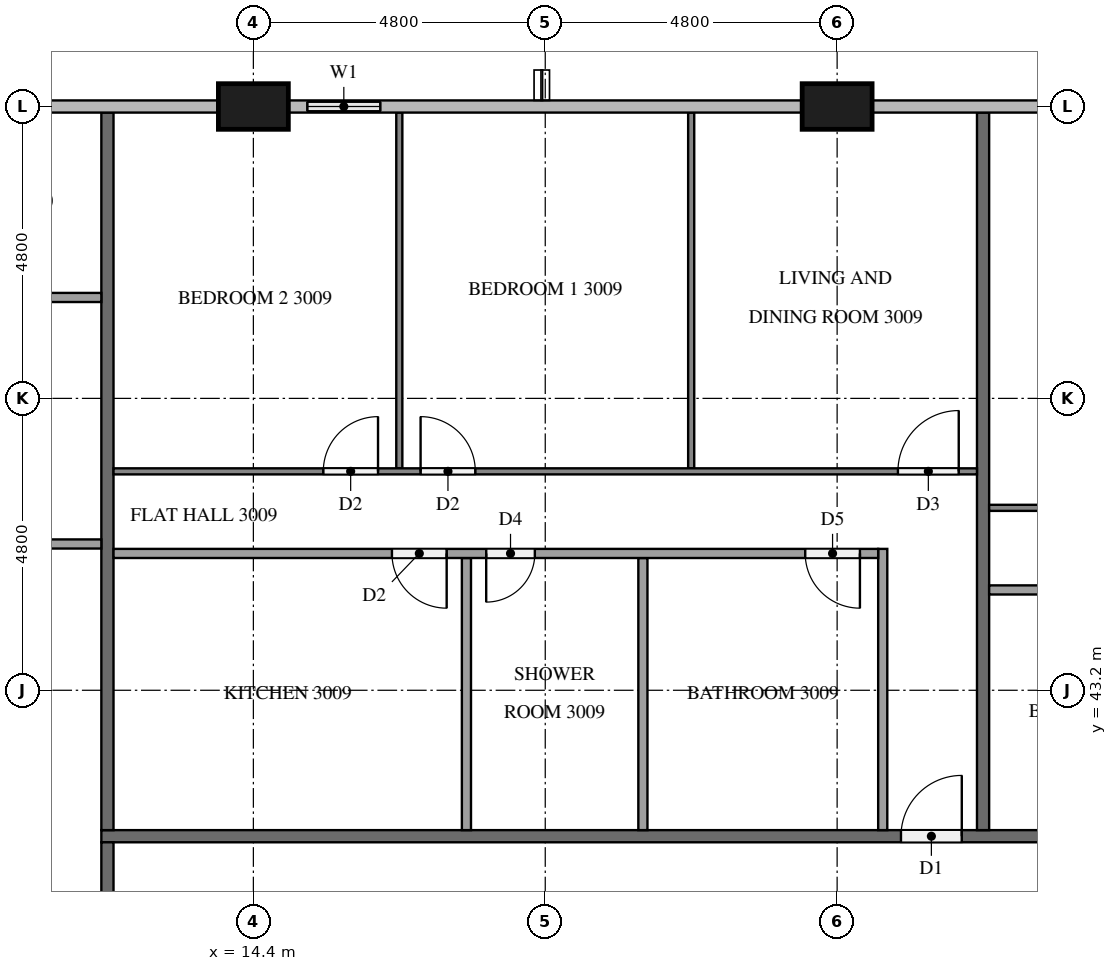
"""IFC4 building model, lengths in metres.
Left out: names, types, materials, properties, quantities, classifications, styles, units other than length and angle.
Written with IfcOpenShell. Run it as: python <this file> out.ifc"""

import sys

from ifc_helpers import new_model, si_unit, direction, frame, frame_2d, origin, origin_2d, place, context, subcontext, project, spatial, rectangle, extrude, element, fill, save


model = new_model("IFC4")
c1 = context("Model", 3, precision=1e-05, world=origin(), true_north=direction((0.0, 1.0)))
c2 = subcontext(c1, "Body", "Model", "MODEL_VIEW")
j1 = project(units=[si_unit("LENGTHUNIT", "METRE"), si_unit("PLANEANGLEUNIT", "RADIAN")], contexts=[c1])
p1 = place(None, origin())
s1 = spatial("IfcSite", under=j1, at=p1, CompositionType="ELEMENT")
p2 = place(p1, origin())
s2 = spatial("IfcBuilding", under=s1, at=p2, CompositionType="ELEMENT")
p3 = place(p2, frame((0.0, 0.0, 119.1)))
s3 = spatial("IfcBuildingStorey", under=s2, at=p3, CompositionType="ELEMENT", Elevation=119.1)
for number, where, z_axis, x_axis in (
    (1, (24.0, 52.8, 0.0), (0.0, 0.0, 1.0), (1.0, 0.0, 0.0)),
    (2, (14.4, 52.8, 0.0), (0.0, 0.0, 1.0), (1.0, 0.0, 0.0)),
):
    element("IfcColumn", number, at=place(p3, frame(where, z_axis=z_axis, x_axis=x_axis)), inside=s3, PredefinedType="COLUMN", context=c2, shape_type="SweptSolid", body=[
        extrude(rectangle(XDim=1.15, YDim=0.75, at=origin_2d()), origin(), (0.0, 0.0, 1.0), 3.2),
    ])
p4 = place(p3, frame((16.8, 52.8, 0.0), z_axis=(0.0, 0.0, 1.0), x_axis=(-1.0, 0.0, 0.0)))
e3 = element("IfcWall", 3, at=p4, inside=s3, PredefinedType="SOLIDWALL", context=c2, shape_type="SweptSolid", body=[
    extrude(rectangle(XDim=1.825, YDim=0.15, at=frame_2d((0.913, 0.0))), origin(), (0.0, 0.0, 1.0), 3.2),
])
p5 = place(p4, frame((0.312, 0.0, 0.9)))
e4 = element("IfcOpeningElement", 4, at=p5, cuts=e3, PredefinedType="OPENING", context=c2, shape_type="SweptSolid", body=[
    extrude(rectangle(XDim=1.2, YDim=1.4, at=frame_2d((0.6, 0.7))), frame((0.0, 0.085, 0.0), z_axis=(0.0, -1.0, 0.0), x_axis=(1.0, 0.0, 0.0)), (0.0, 0.0, 1.0), 0.17),
])
p6 = place(p3, frame((11.9, 40.8, 0.0), z_axis=(0.0, 0.0, 1.0), x_axis=(1.0, 0.0, 0.0)))
e5 = element("IfcWall", 5, at=p6, inside=s3, PredefinedType="PARTITIONING", context=c2, shape_type="SweptSolid", body=[
    extrude(rectangle(XDim=38.6, YDim=0.2, at=frame_2d((19.3, 0.0))), origin(), (0.0, 0.0, 1.0), 3.2),
])
p7 = place(p6, frame((37.15, 0.0, 0.0)))
e6 = element("IfcOpeningElement", 6, at=p7, cuts=e5, PredefinedType="OPENING", context=c2, shape_type="SweptSolid", body=[
    extrude(rectangle(XDim=1.0, YDim=2.1, at=frame_2d((0.5, 1.05))), frame((0.0, 0.11, 0.0), z_axis=(0.0, -1.0, 0.0), x_axis=(1.0, 0.0, 0.0)), (0.0, 0.0, 1.0), 0.22),
])
p8 = place(p6, frame((27.55, 0.0, 0.0)))
e7 = element("IfcOpeningElement", 7, at=p8, cuts=e5, PredefinedType="OPENING", context=c2, shape_type="SweptSolid", body=[
    extrude(rectangle(XDim=1.0, YDim=2.1, at=frame_2d((0.5, 1.05))), frame((0.0, 0.11, 0.0), z_axis=(0.0, -1.0, 0.0), x_axis=(1.0, 0.0, 0.0)), (0.0, 0.0, 1.0), 0.22),
])
p9 = place(p6, frame((13.15, 0.0, 0.0)))
e8 = element("IfcOpeningElement", 8, at=p9, cuts=e5, PredefinedType="OPENING", context=c2, shape_type="SweptSolid", body=[
    extrude(rectangle(XDim=1.0, YDim=2.1, at=frame_2d((0.5, 1.05))), frame((0.0, 0.11, 0.0), z_axis=(0.0, -1.0, 0.0), x_axis=(1.0, 0.0, 0.0)), (0.0, 0.0, 1.0), 0.22),
])
p10 = place(p3, frame((12.0, 37.9, 0.0), z_axis=(0.0, 0.0, 1.0), x_axis=(0.0, 1.0, 0.0)))
e9 = element("IfcWall", 9, at=p10, inside=s3, PredefinedType="PARTITIONING", context=c2, shape_type="SweptSolid", body=[
    extrude(rectangle(XDim=2.8, YDim=0.2, at=frame_2d((1.4, 0.0))), origin(), (0.0, 0.0, 1.0), 3.2),
])
p11 = place(p10, frame((0.25, 0.0, 0.0)))
e10 = element("IfcOpeningElement", 10, at=p11, cuts=e9, PredefinedType="OPENING", context=c2, shape_type="SweptSolid", body=[
    extrude(rectangle(XDim=1.0, YDim=2.1, at=frame_2d((0.5, 1.05))), frame((0.0, 0.11, 0.0), z_axis=(0.0, -1.0, 0.0), x_axis=(1.0, 0.0, 0.0)), (0.0, 0.0, 1.0), 0.22),
])
for number, where, z_axis, x_axis in (
    (11, (26.4, 52.7, 0.0), (0.0, 0.0, 1.0), (0.0, -1.0, 0.0)),
    (12, (12.0, 52.7, 0.0), (0.0, 0.0, 1.0), (0.0, -1.0, 0.0)),
):
    element("IfcWall", number, at=place(p3, frame(where, z_axis=z_axis, x_axis=x_axis)), inside=s3, PredefinedType="PARTITIONING", context=c2, shape_type="SweptSolid", body=[
        extrude(rectangle(XDim=11.8, YDim=0.2, at=frame_2d((5.9, 0.0))), origin(), (0.0, 0.0, 1.0), 3.2),
    ])
p12 = place(p3, frame((26.5, 46.2, 0.0), z_axis=(0.0, 0.0, 1.0), x_axis=(1.0, 0.0, 0.0)))
e13 = element("IfcWall", 13, at=p12, inside=s3, PredefinedType="PARTITIONING", context=c2, shape_type="SweptSolid", body=[
    extrude(rectangle(XDim=14.2, YDim=0.1, at=frame_2d((7.1, 0.0))), origin(), (0.0, 0.0, 1.0), 3.2),
])
p13 = place(p12, frame((12.9, 0.0, 0.0)))
e14 = element("IfcOpeningElement", 14, at=p13, cuts=e13, PredefinedType="OPENING", context=c2, shape_type="SweptSolid", body=[
    extrude(rectangle(XDim=1.0, YDim=2.1, at=frame_2d((0.5, 1.05))), frame((0.0, 0.06, 0.0), z_axis=(0.0, -1.0, 0.0), x_axis=(1.0, 0.0, 0.0)), (0.0, 0.0, 1.0), 0.12),
])
p14 = place(p12, frame((5.05, 0.0, 0.0)))
e15 = element("IfcOpeningElement", 15, at=p14, cuts=e13, PredefinedType="OPENING", context=c2, shape_type="SweptSolid", body=[
    extrude(rectangle(XDim=0.9, YDim=2.1, at=frame_2d((0.45, 1.05))), frame((0.0, 0.06, 0.0), z_axis=(0.0, -1.0, 0.0), x_axis=(1.0, 0.0, 0.0)), (0.0, 0.0, 1.0), 0.12),
])
p15 = place(p12, frame((3.45, 0.0, 0.0)))
e16 = element("IfcOpeningElement", 16, at=p15, cuts=e13, PredefinedType="OPENING", context=c2, shape_type="SweptSolid", body=[
    extrude(rectangle(XDim=0.9, YDim=2.1, at=frame_2d((0.45, 1.05))), frame((0.0, 0.06, 0.0), z_axis=(0.0, -1.0, 0.0), x_axis=(1.0, 0.0, 0.0)), (0.0, 0.0, 1.0), 0.12),
])
p16 = place(p3, frame((39.075, 44.85, 0.0), z_axis=(0.0, 0.0, 1.0), x_axis=(-1.0, 0.0, 0.0)))
e17 = element("IfcWall", 17, at=p16, inside=s3, PredefinedType="PARTITIONING", context=c2, shape_type="SweptSolid", body=[
    extrude(rectangle(XDim=12.575, YDim=0.15, at=frame_2d((6.288, 0.0))), origin(), (0.0, 0.0, 1.0), 3.2),
])
p17 = place(p16, frame((0.3, 0.0, 0.0)))
e18 = element("IfcOpeningElement", 18, at=p17, cuts=e17, PredefinedType="OPENING", context=c2, shape_type="SweptSolid", body=[
    extrude(rectangle(XDim=0.8, YDim=2.1, at=frame_2d((0.4, 1.05))), frame((0.0, 0.085, 0.0), z_axis=(0.0, -1.0, 0.0), x_axis=(1.0, 0.0, 0.0)), (0.0, 0.0, 1.0), 0.17),
])
p18 = place(p16, frame((7.481, 0.0, 0.0)))
e19 = element("IfcOpeningElement", 19, at=p18, cuts=e17, PredefinedType="OPENING", context=c2, shape_type="SweptSolid", body=[
    extrude(rectangle(XDim=0.9, YDim=2.1, at=frame_2d((0.45, 1.05))), frame((0.0, 0.085, 0.0), z_axis=(0.0, -1.0, 0.0), x_axis=(1.0, 0.0, 0.0)), (0.0, 0.0, 1.0), 0.17),
])
p19 = place(p16, frame((9.031, 0.0, 0.0)))
e20 = element("IfcOpeningElement", 20, at=p19, cuts=e17, PredefinedType="OPENING", context=c2, shape_type="SweptSolid", body=[
    extrude(rectangle(XDim=0.9, YDim=2.1, at=frame_2d((0.45, 1.05))), frame((0.0, 0.085, 0.0), z_axis=(0.0, -1.0, 0.0), x_axis=(1.0, 0.0, 0.0)), (0.0, 0.0, 1.0), 0.17),
])
for number, where, z_axis, x_axis in (
    (21, (21.6, 46.85, 0.0), (0.0, 0.0, 1.0), (0.0, 1.0, 0.0)),
    (22, (16.8, 46.85, 0.0), (0.0, 0.0, 1.0), (0.0, 1.0, 0.0)),
):
    element("IfcWall", number, at=place(p3, frame(where, z_axis=z_axis, x_axis=x_axis)), inside=s3, PredefinedType="PARTITIONING", context=c2, shape_type="SweptSolid", body=[
        extrude(rectangle(XDim=5.85, YDim=0.1, at=frame_2d((2.925, 0.0))), origin(), (0.0, 0.0, 1.0), 3.2),
    ])
p20 = place(p3, frame((12.1, 46.8, 0.0), z_axis=(0.0, 0.0, 1.0), x_axis=(1.0, 0.0, 0.0)))
e23 = element("IfcWall", 23, at=p20, inside=s3, PredefinedType="PARTITIONING", context=c2, shape_type="SweptSolid", body=[
    extrude(rectangle(XDim=14.2, YDim=0.1, at=frame_2d((7.1, 0.0))), origin(), (0.0, 0.0, 1.0), 3.2),
])
p21 = place(p20, frame((12.9, 0.0, 0.0)))
e24 = element("IfcOpeningElement", 24, at=p21, cuts=e23, PredefinedType="OPENING", context=c2, shape_type="SweptSolid", body=[
    extrude(rectangle(XDim=1.0, YDim=2.1, at=frame_2d((0.5, 1.05))), frame((0.0, 0.06, 0.0), z_axis=(0.0, -1.0, 0.0), x_axis=(1.0, 0.0, 0.0)), (0.0, 0.0, 1.0), 0.12),
])
p22 = place(p20, frame((5.05, 0.0, 0.0)))
e25 = element("IfcOpeningElement", 25, at=p22, cuts=e23, PredefinedType="OPENING", context=c2, shape_type="SweptSolid", body=[
    extrude(rectangle(XDim=0.9, YDim=2.1, at=frame_2d((0.45, 1.05))), frame((0.0, 0.06, 0.0), z_axis=(0.0, -1.0, 0.0), x_axis=(1.0, 0.0, 0.0)), (0.0, 0.0, 1.0), 0.12),
])
p23 = place(p20, frame((3.45, 0.0, 0.0)))
e26 = element("IfcOpeningElement", 26, at=p23, cuts=e23, PredefinedType="OPENING", context=c2, shape_type="SweptSolid", body=[
    extrude(rectangle(XDim=0.9, YDim=2.1, at=frame_2d((0.45, 1.05))), frame((0.0, 0.06, 0.0), z_axis=(0.0, -1.0, 0.0), x_axis=(1.0, 0.0, 0.0)), (0.0, 0.0, 1.0), 0.12),
])
for number, where, z_axis, x_axis in (
    (27, (20.806, 40.9, 0.0), (0.0, 0.0, 1.0), (0.0, 1.0, 0.0)),
    (28, (17.904, 40.9, 0.0), (0.0, 0.0, 1.0), (0.0, 1.0, 0.0)),
):
    element("IfcWall", number, at=place(p3, frame(where, z_axis=z_axis, x_axis=x_axis)), inside=s3, PredefinedType="PARTITIONING", context=c2, shape_type="SweptSolid", body=[
        extrude(rectangle(XDim=4.475, YDim=0.15, at=frame_2d((2.238, 0.0))), origin(), (0.0, 0.0, 1.0), 3.2),
    ])
p24 = place(p3, frame((24.75, 40.9, 0.0), z_axis=(0.0, 0.0, 1.0), x_axis=(0.0, 1.0, 0.0)))
e29 = element("IfcWall", 29, at=p24, inside=s3, PredefinedType="PARTITIONING", context=c2, shape_type="SweptSolid", body=[
    extrude(rectangle(XDim=4.625, YDim=0.15, at=frame_2d((2.312, 0.0))), origin(), (0.0, 0.0, 1.0), 3.2),
])
p25 = place(p3, frame((24.675, 45.45, 0.0), z_axis=(0.0, 0.0, 1.0), x_axis=(-1.0, 0.0, 0.0)))
e30 = element("IfcWall", 30, at=p25, inside=s3, PredefinedType="PARTITIONING", context=c2, shape_type="SweptSolid", body=[
    extrude(rectangle(XDim=12.575, YDim=0.15, at=frame_2d((6.288, 0.0))), origin(), (0.0, 0.0, 1.0), 3.2),
])
p26 = place(p25, frame((0.3, 0.0, 0.0)))
e31 = element("IfcOpeningElement", 31, at=p26, cuts=e30, PredefinedType="OPENING", context=c2, shape_type="SweptSolid", body=[
    extrude(rectangle(XDim=0.9, YDim=2.1, at=frame_2d((0.45, 1.05))), frame((0.0, 0.085, 0.0), z_axis=(0.0, -1.0, 0.0), x_axis=(1.0, 0.0, 0.0)), (0.0, 0.0, 1.0), 0.17),
])
p27 = place(p25, frame((5.646, 0.0, 0.0)))
e32 = element("IfcOpeningElement", 32, at=p27, cuts=e30, PredefinedType="OPENING", context=c2, shape_type="SweptSolid", body=[
    extrude(rectangle(XDim=0.8, YDim=2.1, at=frame_2d((0.4, 1.05))), frame((0.0, 0.085, 0.0), z_axis=(0.0, -1.0, 0.0), x_axis=(1.0, 0.0, 0.0)), (0.0, 0.0, 1.0), 0.17),
])
p28 = place(p25, frame((7.096, 0.0, 0.0)))
e33 = element("IfcOpeningElement", 33, at=p28, cuts=e30, PredefinedType="OPENING", context=c2, shape_type="SweptSolid", body=[
    extrude(rectangle(XDim=0.9, YDim=2.1, at=frame_2d((0.45, 1.05))), frame((0.0, 0.085, 0.0), z_axis=(0.0, -1.0, 0.0), x_axis=(1.0, 0.0, 0.0)), (0.0, 0.0, 1.0), 0.17),
])
for number, where, z_axis, x_axis in (
    (34, (11.9, 45.606, 0.0), (0.0, 0.0, 1.0), (-1.0, 0.0, 0.0)),
    (35, (11.9, 49.66, 0.0), (0.0, 0.0, 1.0), (-1.0, 0.0, 0.0)),
):
    element("IfcWall", number, at=place(p3, frame(where, z_axis=z_axis, x_axis=x_axis)), inside=s3, PredefinedType="PARTITIONING", context=c2, shape_type="SweptSolid", body=[
        extrude(rectangle(XDim=4.175, YDim=0.15, at=frame_2d((2.087, 0.0))), origin(), (0.0, 0.0, 1.0), 3.2),
    ])
p29 = place(p5, origin())
e36 = element("IfcWindow", 36, at=p29, inside=s3, PartitioningType="SINGLE_PANEL", PredefinedType="WINDOW", context=c2, shape_type="SweptSolid", body=[
    extrude(rectangle(XDim=1.2, YDim=1.4, at=frame_2d((0.6, 0.7))), frame((0.0, 0.03, 0.0), z_axis=(0.0, -1.0, 0.0), x_axis=(1.0, 0.0, 0.0)), (0.0, 0.0, 1.0), 0.06),
])
fill(e4, e36)
p30 = place(p9, origin())
e37 = element("IfcDoor", 37, at=p30, inside=s3, OperationType="SINGLE_SWING_RIGHT", PredefinedType="DOOR", context=c2, shape_type="SweptSolid", body=[
    extrude(rectangle(XDim=1.0, YDim=2.1, at=frame_2d((0.5, 1.05))), frame((0.0, 0.025, 0.0), z_axis=(0.0, -1.0, 0.0), x_axis=(1.0, 0.0, 0.0)), (0.0, 0.0, 1.0), 0.05),
])
fill(e8, e37)
p31 = place(p21, origin())
e38 = element("IfcDoor", 38, at=p31, inside=s3, OperationType="SINGLE_SWING_RIGHT", PredefinedType="DOOR", context=c2, shape_type="SweptSolid", body=[
    extrude(rectangle(XDim=1.0, YDim=2.1, at=frame_2d((0.5, 1.05))), frame((0.0, 0.025, 0.0), z_axis=(0.0, -1.0, 0.0), x_axis=(1.0, 0.0, 0.0)), (0.0, 0.0, 1.0), 0.05),
])
fill(e24, e38)
p32 = place(p22, origin())
e39 = element("IfcDoor", 39, at=p32, inside=s3, OperationType="SINGLE_SWING_LEFT", PredefinedType="DOOR", context=c2, shape_type="SweptSolid", body=[
    extrude(rectangle(XDim=0.9, YDim=2.1, at=frame_2d((0.45, 1.05))), frame((0.0, 0.025, 0.0), z_axis=(0.0, -1.0, 0.0), x_axis=(1.0, 0.0, 0.0)), (0.0, 0.0, 1.0), 0.05),
])
fill(e25, e39)
p33 = place(p23, origin())
e40 = element("IfcDoor", 40, at=p33, inside=s3, OperationType="SINGLE_SWING_RIGHT", PredefinedType="DOOR", context=c2, shape_type="SweptSolid", body=[
    extrude(rectangle(XDim=0.9, YDim=2.1, at=frame_2d((0.45, 1.05))), frame((0.0, 0.025, 0.0), z_axis=(0.0, -1.0, 0.0), x_axis=(1.0, 0.0, 0.0)), (0.0, 0.0, 1.0), 0.05),
])
fill(e26, e40)
p34 = place(p26, origin())
e41 = element("IfcDoor", 41, at=p34, inside=s3, OperationType="SINGLE_SWING_LEFT", PredefinedType="DOOR", context=c2, shape_type="SweptSolid", body=[
    extrude(rectangle(XDim=0.9, YDim=2.1, at=frame_2d((0.45, 1.05))), frame((0.0, 0.025, 0.0), z_axis=(0.0, -1.0, 0.0), x_axis=(1.0, 0.0, 0.0)), (0.0, 0.0, 1.0), 0.05),
])
fill(e31, e41)
p35 = place(p27, origin())
e42 = element("IfcDoor", 42, at=p35, inside=s3, OperationType="SINGLE_SWING_RIGHT", PredefinedType="DOOR", context=c2, shape_type="SweptSolid", body=[
    extrude(rectangle(XDim=0.8, YDim=2.1, at=frame_2d((0.4, 1.05))), frame((0.0, 0.025, 0.0), z_axis=(0.0, -1.0, 0.0), x_axis=(1.0, 0.0, 0.0)), (0.0, 0.0, 1.0), 0.05),
])
fill(e32, e42)
p36 = place(p28, origin())
e43 = element("IfcDoor", 43, at=p36, inside=s3, OperationType="SINGLE_SWING_LEFT", PredefinedType="DOOR", context=c2, shape_type="SweptSolid", body=[
    extrude(rectangle(XDim=0.9, YDim=2.1, at=frame_2d((0.45, 1.05))), frame((0.0, 0.025, 0.0), z_axis=(0.0, -1.0, 0.0), x_axis=(1.0, 0.0, 0.0)), (0.0, 0.0, 1.0), 0.05),
])
fill(e33, e43)
save(model, sys.argv[1])
